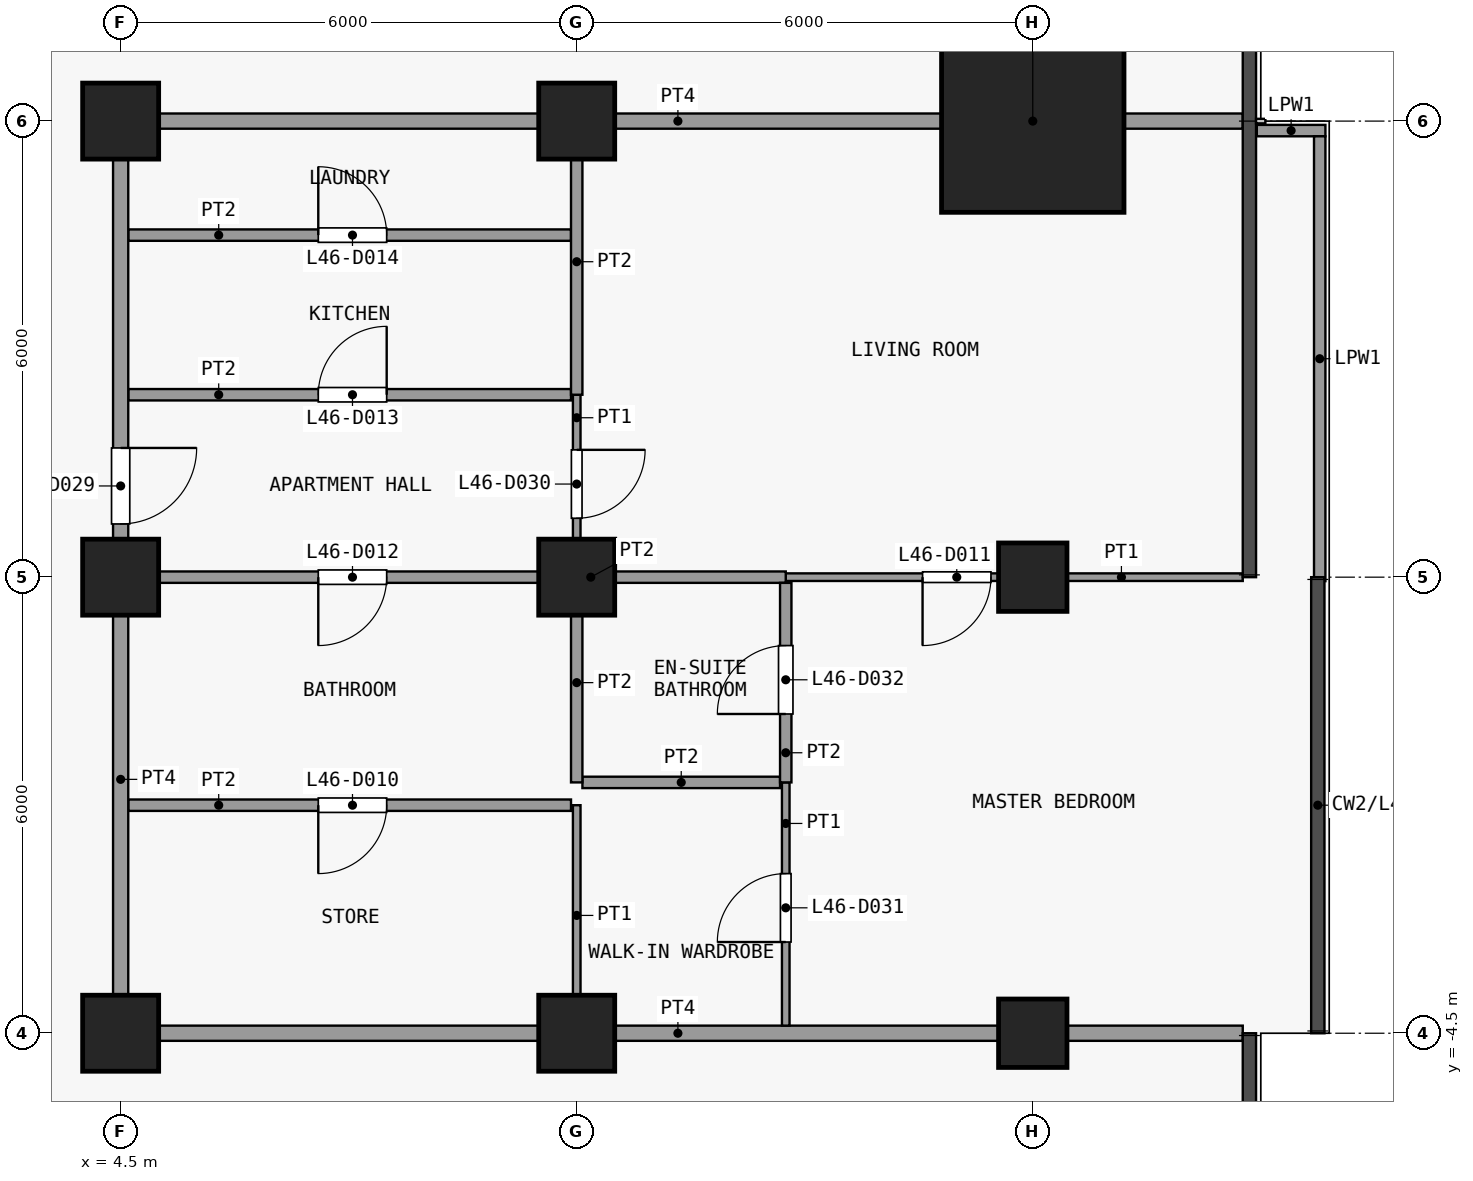
"""IFC4 building model, lengths in metres.
Left out: names, types, materials, properties, quantities, classifications, styles, units other than length and angle.
Written with IfcOpenShell. Run it as: python <this file> out.ifc"""

import sys

from ifc_helpers import new_model, si_unit, direction, frame, frame_2d, origin, origin_2d, place, context, subcontext, project, spatial, rectangle, extrude, element, fill, save


model = new_model("IFC4")
c1 = context("Model", 3, precision=1e-05, world=origin(), true_north=direction((0.0, 1.0)))
c2 = subcontext(c1, "Body", "Model", "MODEL_VIEW")
j1 = project(units=[si_unit("LENGTHUNIT", "METRE"), si_unit("PLANEANGLEUNIT", "RADIAN")], contexts=[c1])
p1 = place(None, origin())
s1 = spatial("IfcSite", under=j1, at=p1, CompositionType="ELEMENT")
p2 = place(p1, origin())
s2 = spatial("IfcBuilding", under=s1, at=p2, CompositionType="ELEMENT")
p3 = place(p2, frame((0.0, 0.0, 185.3)))
s3 = spatial("IfcBuildingStorey", under=s2, at=p3, CompositionType="ELEMENT", Elevation=185.3)
for number, where, z_axis, x_axis in (
    (1, (4.5, -4.5, 0.0), (0.0, 0.0, 1.0), (1.0, 0.0, 0.0)),
    (2, (4.5, 1.5, 0.0), (0.0, 0.0, 1.0), (1.0, 0.0, 0.0)),
    (3, (4.5, 7.5, 0.0), (0.0, 0.0, 1.0), (1.0, 0.0, 0.0)),
    (4, (10.5, -4.5, 0.0), (0.0, 0.0, 1.0), (1.0, 0.0, 0.0)),
    (5, (10.5, 1.5, 0.0), (0.0, 0.0, 1.0), (1.0, 0.0, 0.0)),
    (6, (10.5, 7.5, 0.0), (0.0, 0.0, 1.0), (1.0, 0.0, 0.0)),
):
    element("IfcColumn", number, at=place(p3, frame(where, z_axis=z_axis, x_axis=x_axis)), inside=s3, PredefinedType="COLUMN", context=c2, shape_type="SweptSolid", body=[
        extrude(rectangle(XDim=1.0, YDim=1.0, at=origin_2d()), origin(), (0.0, 0.0, 1.0), 3.6),
    ])
for number, where, z_axis, x_axis in (
    (7, (16.5, -4.5, 0.0), (0.0, 0.0, 1.0), (1.0, 0.0, 0.0)),
    (8, (16.5, 1.5, 0.0), (0.0, 0.0, 1.0), (1.0, 0.0, 0.0)),
):
    element("IfcColumn", number, at=place(p3, frame(where, z_axis=z_axis, x_axis=x_axis)), inside=s3, PredefinedType="COLUMN", context=c2, shape_type="SweptSolid", body=[
        extrude(rectangle(XDim=0.9, YDim=0.9, at=origin_2d()), origin(), (0.0, 0.0, 1.0), 3.6),
    ])
p4 = place(p3, frame((16.5, 7.5, 0.0), z_axis=(0.0, 0.0, 1.0), x_axis=(1.0, 0.0, 0.0)))
e9 = element("IfcColumn", 9, at=p4, inside=s3, PredefinedType="COLUMN", context=c2, shape_type="SweptSolid", body=[
    extrude(rectangle(XDim=2.4, YDim=2.4, at=origin_2d()), origin(), (0.0, 0.0, 1.0), 3.6),
])
p5 = place(p3, frame((19.448, 7.375, 0.0), z_axis=(0.0, 0.0, 1.0), x_axis=(1.0, 0.0, 0.0)))
e10 = element("IfcWall", 10, at=p5, inside=s3, PredefinedType="PARAPET", context=c2, shape_type="SweptSolid", body=[
    extrude(rectangle(XDim=0.903, YDim=0.15, at=frame_2d((0.451, 0.0))), origin(), (0.0, 0.0, 1.0), 1.15),
])
p6 = place(p3, frame((20.275, 7.3, 0.0), z_axis=(0.0, 0.0, 1.0), x_axis=(0.0, -1.0, 0.0)))
e11 = element("IfcWall", 11, at=p6, inside=s3, PredefinedType="PARAPET", context=c2, shape_type="SweptSolid", body=[
    extrude(rectangle(XDim=5.853, YDim=0.15, at=frame_2d((2.926, 0.0))), origin(), (0.0, 0.0, 1.0), 1.15),
])
p7 = place(p3, frame((4.4, -4.5, 0.0), z_axis=(0.0, 0.0, 1.0), x_axis=(1.0, 0.0, 0.0)))
e12 = element("IfcWall", 12, at=p7, inside=s3, PredefinedType="PARTITIONING", context=c2, shape_type="SweptSolid", body=[
    extrude(rectangle(XDim=14.863, YDim=0.2, at=frame_2d((7.431, 0.0))), origin(), (0.0, 0.0, 1.0), 3.3),
])
p8 = place(p3, frame((4.6, -1.5, 0.0), z_axis=(0.0, 0.0, 1.0), x_axis=(1.0, 0.0, 0.0)))
e13 = element("IfcWall", 13, at=p8, inside=s3, PredefinedType="PARTITIONING", context=c2, shape_type="SweptSolid", body=[
    extrude(rectangle(XDim=5.825, YDim=0.15, at=frame_2d((2.913, 0.0))), origin(), (0.0, 0.0, 1.0), 3.3),
])
p9 = place(p8, frame((2.5, 0.0, 0.0)))
e14 = element("IfcOpeningElement", 14, at=p9, cuts=e13, PredefinedType="OPENING", context=c2, shape_type="SweptSolid", body=[
    extrude(rectangle(XDim=0.9, YDim=2.1, at=frame_2d((0.45, 1.05))), frame((0.0, 0.085, 0.0), z_axis=(0.0, -1.0, 0.0), x_axis=(1.0, 0.0, 0.0)), (0.0, 0.0, 1.0), 0.17),
])
p10 = place(p3, frame((10.575, -1.2, 0.0), z_axis=(0.0, 0.0, 1.0), x_axis=(1.0, 0.0, 0.0)))
e15 = element("IfcWall", 15, at=p10, inside=s3, PredefinedType="PARTITIONING", context=c2, shape_type="SweptSolid", body=[
    extrude(rectangle(XDim=2.6, YDim=0.15, at=frame_2d((1.3, 0.0))), origin(), (0.0, 0.0, 1.0), 3.3),
])
p11 = place(p3, frame((13.25, 1.5, 0.0), z_axis=(0.0, 0.0, 1.0), x_axis=(1.0, 0.0, 0.0)))
e16 = element("IfcWall", 16, at=p11, inside=s3, PredefinedType="PARTITIONING", context=c2, shape_type="SweptSolid", body=[
    extrude(rectangle(XDim=6.012, YDim=0.1, at=frame_2d((3.006, 0.0))), origin(), (0.0, 0.0, 1.0), 3.3),
])
p12 = place(p11, frame((1.8, 0.0, 0.0)))
e17 = element("IfcOpeningElement", 17, at=p12, cuts=e16, PredefinedType="OPENING", context=c2, shape_type="SweptSolid", body=[
    extrude(rectangle(XDim=0.9, YDim=2.1, at=frame_2d((0.45, 1.05))), frame((0.0, 0.06, 0.0), z_axis=(0.0, -1.0, 0.0), x_axis=(1.0, 0.0, 0.0)), (0.0, 0.0, 1.0), 0.12),
])
p13 = place(p3, frame((4.6, 1.5, 0.0), z_axis=(0.0, 0.0, 1.0), x_axis=(1.0, 0.0, 0.0)))
e18 = element("IfcWall", 18, at=p13, inside=s3, PredefinedType="PARTITIONING", context=c2, shape_type="SweptSolid", body=[
    extrude(rectangle(XDim=8.65, YDim=0.15, at=frame_2d((4.325, 0.0))), origin(), (0.0, 0.0, 1.0), 3.3),
])
p14 = place(p13, frame((2.5, 0.0, 0.0)))
e19 = element("IfcOpeningElement", 19, at=p14, cuts=e18, PredefinedType="OPENING", context=c2, shape_type="SweptSolid", body=[
    extrude(rectangle(XDim=0.9, YDim=2.1, at=frame_2d((0.45, 1.05))), frame((0.0, 0.085, 0.0), z_axis=(0.0, -1.0, 0.0), x_axis=(1.0, 0.0, 0.0)), (0.0, 0.0, 1.0), 0.17),
])
p15 = place(p3, frame((4.6, 3.9, 0.0), z_axis=(0.0, 0.0, 1.0), x_axis=(1.0, 0.0, 0.0)))
e20 = element("IfcWall", 20, at=p15, inside=s3, PredefinedType="PARTITIONING", context=c2, shape_type="SweptSolid", body=[
    extrude(rectangle(XDim=5.825, YDim=0.15, at=frame_2d((2.913, 0.0))), origin(), (0.0, 0.0, 1.0), 3.3),
])
p16 = place(p15, frame((2.5, 0.0, 0.0)))
e21 = element("IfcOpeningElement", 21, at=p16, cuts=e20, PredefinedType="OPENING", context=c2, shape_type="SweptSolid", body=[
    extrude(rectangle(XDim=0.9, YDim=2.1, at=frame_2d((0.45, 1.05))), frame((0.0, 0.085, 0.0), z_axis=(0.0, -1.0, 0.0), x_axis=(1.0, 0.0, 0.0)), (0.0, 0.0, 1.0), 0.17),
])
p17 = place(p3, frame((4.6, 6.0, 0.0), z_axis=(0.0, 0.0, 1.0), x_axis=(1.0, 0.0, 0.0)))
e22 = element("IfcWall", 22, at=p17, inside=s3, PredefinedType="PARTITIONING", context=c2, shape_type="SweptSolid", body=[
    extrude(rectangle(XDim=5.825, YDim=0.15, at=frame_2d((2.913, 0.0))), origin(), (0.0, 0.0, 1.0), 3.3),
])
p18 = place(p17, frame((2.5, 0.0, 0.0)))
e23 = element("IfcOpeningElement", 23, at=p18, cuts=e22, PredefinedType="OPENING", context=c2, shape_type="SweptSolid", body=[
    extrude(rectangle(XDim=0.9, YDim=2.1, at=frame_2d((0.45, 1.05))), frame((0.0, 0.085, 0.0), z_axis=(0.0, -1.0, 0.0), x_axis=(1.0, 0.0, 0.0)), (0.0, 0.0, 1.0), 0.17),
])
p19 = place(p3, frame((4.4, 7.5, 0.0), z_axis=(0.0, 0.0, 1.0), x_axis=(1.0, 0.0, 0.0)))
e24 = element("IfcWall", 24, at=p19, inside=s3, PredefinedType="PARTITIONING", context=c2, shape_type="SweptSolid", body=[
    extrude(rectangle(XDim=14.863, YDim=0.2, at=frame_2d((7.431, 0.0))), origin(), (0.0, 0.0, 1.0), 3.3),
])
p20 = place(p3, frame((4.5, -4.4, 0.0), z_axis=(0.0, 0.0, 1.0), x_axis=(0.0, 1.0, 0.0)))
e25 = element("IfcWall", 25, at=p20, inside=s3, PredefinedType="PARTITIONING", context=c2, shape_type="SweptSolid", body=[
    extrude(rectangle(XDim=11.8, YDim=0.2, at=frame_2d((5.9, 0.0))), origin(), (0.0, 0.0, 1.0), 3.3),
])
p21 = place(p20, frame((6.6, 0.0, 0.0)))
e26 = element("IfcOpeningElement", 26, at=p21, cuts=e25, PredefinedType="OPENING", context=c2, shape_type="SweptSolid", body=[
    extrude(rectangle(XDim=1.0, YDim=2.1, at=frame_2d((0.5, 1.05))), frame((0.0, 0.11, 0.0), z_axis=(0.0, -1.0, 0.0), x_axis=(1.0, 0.0, 0.0)), (0.0, 0.0, 1.0), 0.22),
])
p22 = place(p3, frame((10.5, -4.4, 0.0), z_axis=(0.0, 0.0, 1.0), x_axis=(0.0, 1.0, 0.0)))
e27 = element("IfcWall", 27, at=p22, inside=s3, PredefinedType="PARTITIONING", context=c2, shape_type="SweptSolid", body=[
    extrude(rectangle(XDim=2.9, YDim=0.1, at=frame_2d((1.45, 0.0))), origin(), (0.0, 0.0, 1.0), 3.3),
])
p23 = place(p3, frame((10.5, 1.575, 0.0), z_axis=(0.0, 0.0, 1.0), x_axis=(0.0, 1.0, 0.0)))
e28 = element("IfcWall", 28, at=p23, inside=s3, PredefinedType="PARTITIONING", context=c2, shape_type="SweptSolid", body=[
    extrude(rectangle(XDim=2.325, YDim=0.1, at=frame_2d((1.163, 0.0))), origin(), (0.0, 0.0, 1.0), 3.3),
])
p24 = place(p23, frame((0.7, 0.0, 0.0)))
e29 = element("IfcOpeningElement", 29, at=p24, cuts=e28, PredefinedType="OPENING", context=c2, shape_type="SweptSolid", body=[
    extrude(rectangle(XDim=0.9, YDim=2.1, at=frame_2d((0.45, 1.05))), frame((0.0, 0.06, 0.0), z_axis=(0.0, -1.0, 0.0), x_axis=(1.0, 0.0, 0.0)), (0.0, 0.0, 1.0), 0.12),
])
p25 = place(p3, frame((10.5, -1.2, 0.0), z_axis=(0.0, 0.0, 1.0), x_axis=(0.0, 1.0, 0.0)))
e30 = element("IfcWall", 30, at=p25, inside=s3, PredefinedType="PARTITIONING", context=c2, shape_type="SweptSolid", body=[
    extrude(rectangle(XDim=2.625, YDim=0.15, at=frame_2d((1.312, 0.0))), origin(), (0.0, 0.0, 1.0), 3.3),
])
p26 = place(p3, frame((10.5, 3.9, 0.0), z_axis=(0.0, 0.0, 1.0), x_axis=(0.0, 1.0, 0.0)))
e31 = element("IfcWall", 31, at=p26, inside=s3, PredefinedType="PARTITIONING", context=c2, shape_type="SweptSolid", body=[
    extrude(rectangle(XDim=3.5, YDim=0.15, at=frame_2d((1.75, 0.0))), origin(), (0.0, 0.0, 1.0), 3.3),
])
p27 = place(p3, frame((13.25, -4.4, 0.0), z_axis=(0.0, 0.0, 1.0), x_axis=(0.0, 1.0, 0.0)))
e32 = element("IfcWall", 32, at=p27, inside=s3, PredefinedType="PARTITIONING", context=c2, shape_type="SweptSolid", body=[
    extrude(rectangle(XDim=3.2, YDim=0.1, at=frame_2d((1.6, 0.0))), origin(), (0.0, 0.0, 1.0), 3.3),
])
p28 = place(p27, frame((1.1, 0.0, 0.0)))
e33 = element("IfcOpeningElement", 33, at=p28, cuts=e32, PredefinedType="OPENING", context=c2, shape_type="SweptSolid", body=[
    extrude(rectangle(XDim=0.9, YDim=2.1, at=frame_2d((0.45, 1.05))), frame((0.0, 0.06, 0.0), z_axis=(0.0, -1.0, 0.0), x_axis=(1.0, 0.0, 0.0)), (0.0, 0.0, 1.0), 0.12),
])
p29 = place(p3, frame((13.25, -1.2, 0.0), z_axis=(0.0, 0.0, 1.0), x_axis=(0.0, 1.0, 0.0)))
e34 = element("IfcWall", 34, at=p29, inside=s3, PredefinedType="PARTITIONING", context=c2, shape_type="SweptSolid", body=[
    extrude(rectangle(XDim=2.625, YDim=0.15, at=frame_2d((1.312, 0.0))), origin(), (0.0, 0.0, 1.0), 3.3),
])
p30 = place(p29, frame((0.9, 0.0, 0.0)))
e35 = element("IfcOpeningElement", 35, at=p30, cuts=e34, PredefinedType="OPENING", context=c2, shape_type="SweptSolid", body=[
    extrude(rectangle(XDim=0.9, YDim=2.1, at=frame_2d((0.45, 1.05))), frame((0.0, 0.085, 0.0), z_axis=(0.0, -1.0, 0.0), x_axis=(1.0, 0.0, 0.0)), (0.0, 0.0, 1.0), 0.17),
])
p31 = place(p9, origin())
e36 = element("IfcDoor", 36, at=p31, inside=s3, OperationType="SINGLE_SWING_LEFT", PredefinedType="DOOR", context=c2, shape_type="SweptSolid", body=[
    extrude(rectangle(XDim=0.9, YDim=2.1, at=frame_2d((0.45, 1.05))), frame((0.0, 0.025, 0.0), z_axis=(0.0, -1.0, 0.0), x_axis=(1.0, 0.0, 0.0)), (0.0, 0.0, 1.0), 0.05),
])
fill(e14, e36)
p32 = place(p12, origin())
e37 = element("IfcDoor", 37, at=p32, inside=s3, OperationType="SINGLE_SWING_LEFT", PredefinedType="DOOR", context=c2, shape_type="SweptSolid", body=[
    extrude(rectangle(XDim=0.9, YDim=2.1, at=frame_2d((0.45, 1.05))), frame((0.0, 0.025, 0.0), z_axis=(0.0, -1.0, 0.0), x_axis=(1.0, 0.0, 0.0)), (0.0, 0.0, 1.0), 0.05),
])
fill(e17, e37)
p33 = place(p14, origin())
e38 = element("IfcDoor", 38, at=p33, inside=s3, OperationType="SINGLE_SWING_LEFT", PredefinedType="DOOR", context=c2, shape_type="SweptSolid", body=[
    extrude(rectangle(XDim=0.9, YDim=2.1, at=frame_2d((0.45, 1.05))), frame((0.0, 0.025, 0.0), z_axis=(0.0, -1.0, 0.0), x_axis=(1.0, 0.0, 0.0)), (0.0, 0.0, 1.0), 0.05),
])
fill(e19, e38)
p34 = place(p16, origin())
e39 = element("IfcDoor", 39, at=p34, inside=s3, OperationType="SINGLE_SWING_LEFT", PredefinedType="DOOR", context=c2, shape_type="SweptSolid", body=[
    extrude(rectangle(XDim=0.9, YDim=2.1, at=frame_2d((0.45, 1.05))), frame((0.0, 0.025, 0.0), z_axis=(0.0, -1.0, 0.0), x_axis=(1.0, 0.0, 0.0)), (0.0, 0.0, 1.0), 0.05),
])
fill(e21, e39)
p35 = place(p18, origin())
e40 = element("IfcDoor", 40, at=p35, inside=s3, OperationType="SINGLE_SWING_RIGHT", PredefinedType="DOOR", context=c2, shape_type="SweptSolid", body=[
    extrude(rectangle(XDim=0.9, YDim=2.1, at=frame_2d((0.45, 1.05))), frame((0.0, 0.025, 0.0), z_axis=(0.0, -1.0, 0.0), x_axis=(1.0, 0.0, 0.0)), (0.0, 0.0, 1.0), 0.05),
])
fill(e23, e40)
p36 = place(p21, origin())
e41 = element("IfcDoor", 41, at=p36, inside=s3, OperationType="SINGLE_SWING_RIGHT", PredefinedType="DOOR", context=c2, shape_type="SweptSolid", body=[
    extrude(rectangle(XDim=1.0, YDim=2.1, at=frame_2d((0.5, 1.05))), frame((0.0, 0.025, 0.0), z_axis=(0.0, -1.0, 0.0), x_axis=(1.0, 0.0, 0.0)), (0.0, 0.0, 1.0), 0.05),
])
fill(e26, e41)
p37 = place(p24, origin())
e42 = element("IfcDoor", 42, at=p37, inside=s3, OperationType="SINGLE_SWING_RIGHT", PredefinedType="DOOR", context=c2, shape_type="SweptSolid", body=[
    extrude(rectangle(XDim=0.9, YDim=2.1, at=frame_2d((0.45, 1.05))), frame((0.0, 0.025, 0.0), z_axis=(0.0, -1.0, 0.0), x_axis=(1.0, 0.0, 0.0)), (0.0, 0.0, 1.0), 0.05),
])
fill(e29, e42)
p38 = place(p28, origin())
e43 = element("IfcDoor", 43, at=p38, inside=s3, OperationType="SINGLE_SWING_RIGHT", PredefinedType="DOOR", context=c2, shape_type="SweptSolid", body=[
    extrude(rectangle(XDim=0.9, YDim=2.1, at=frame_2d((0.45, 1.05))), frame((0.0, 0.025, 0.0), z_axis=(0.0, -1.0, 0.0), x_axis=(1.0, 0.0, 0.0)), (0.0, 0.0, 1.0), 0.05),
])
fill(e33, e43)
p39 = place(p30, origin())
e44 = element("IfcDoor", 44, at=p39, inside=s3, OperationType="SINGLE_SWING_RIGHT", PredefinedType="DOOR", context=c2, shape_type="SweptSolid", body=[
    extrude(rectangle(XDim=0.9, YDim=2.1, at=frame_2d((0.45, 1.05))), frame((0.0, 0.025, 0.0), z_axis=(0.0, -1.0, 0.0), x_axis=(1.0, 0.0, 0.0)), (0.0, 0.0, 1.0), 0.05),
])
fill(e35, e44)
save(model, sys.argv[1])
